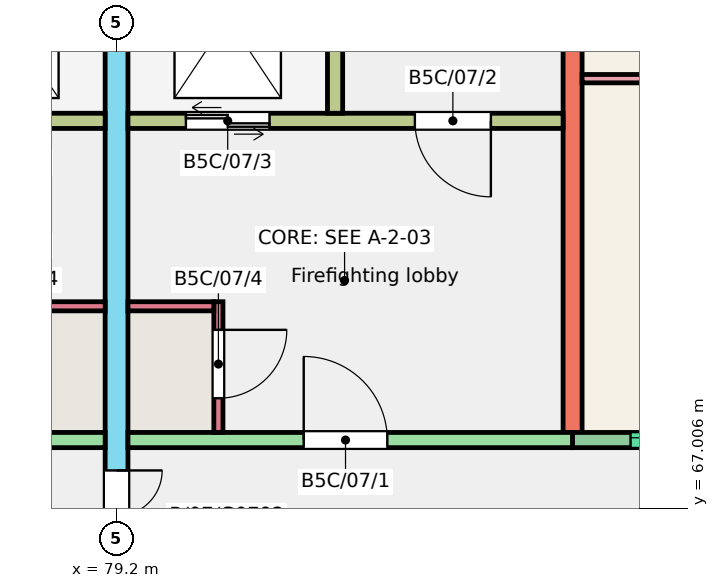
"""IFC4 building model, lengths in metres.
Left out: names, types, materials, properties, quantities, classifications, styles, units other than length and angle.
Written with IfcOpenShell. Run it as: python <this file> out.ifc"""

import sys

from ifc_helpers import new_model, si_unit, direction, frame, frame_2d, origin, place, context, subcontext, project, spatial, rectangle, extrude, element, fill, save


model = new_model("IFC4")
c1 = context("Model", 3, precision=1e-05, world=origin(), true_north=direction((0.0, 1.0)))
c2 = subcontext(c1, "Body", "Model", "MODEL_VIEW")
j1 = project(units=[si_unit("LENGTHUNIT", "METRE"), si_unit("PLANEANGLEUNIT", "RADIAN")], contexts=[c1])
p1 = place(None, origin())
s1 = spatial("IfcSite", under=j1, at=p1, CompositionType="ELEMENT")
p2 = place(p1, origin())
s2 = spatial("IfcBuilding", under=s1, at=p2, CompositionType="ELEMENT")
p3 = place(p2, frame((0.0, 0.0, 21.0)))
s3 = spatial("IfcBuildingStorey", under=s2, at=p3, CompositionType="ELEMENT", Elevation=21.0)
p4 = place(p3, frame((79.2, 66.0, 0.0), z_axis=(0.0, 0.0, 1.0), x_axis=(0.0, 1.0, 0.0)))
e1 = element("IfcWall", 1, at=p4, inside=s3, PredefinedType="SHEAR", context=c2, shape_type="SweptSolid", body=[
    extrude(rectangle(XDim=11.0, YDim=0.3, at=frame_2d((5.5, 0.0))), origin(), (0.0, 0.0, 1.0), 3.0),
])
p5 = place(p4, frame((0.3, 0.0, 0.0)))
e2 = element("IfcOpeningElement", 2, at=p5, cuts=e1, PredefinedType="OPENING", context=c2, shape_type="SweptSolid", body=[
    extrude(rectangle(XDim=1.2, YDim=2.1, at=frame_2d((0.6, 1.05))), frame((0.0, 0.16, 0.0), z_axis=(0.0, -1.0, 0.0), x_axis=(1.0, 0.0, 0.0)), (0.0, 0.0, 1.0), 0.32),
])
p6 = place(p3, frame((85.2, 68.0, 0.0), z_axis=(0.0, 0.0, 1.0), x_axis=(0.0, 1.0, 0.0)))
e3 = element("IfcWall", 3, at=p6, inside=s3, PredefinedType="SHEAR", context=c2, shape_type="SweptSolid", body=[
    extrude(rectangle(XDim=9.0, YDim=0.25, at=frame_2d((4.5, 0.0))), origin(), (0.0, 0.0, 1.0), 3.0),
])
p7 = place(p3, frame((73.2, 67.9, 0.0), z_axis=(0.0, 0.0, 1.0), x_axis=(1.0, 0.0, 0.0)))
e4 = element("IfcWall", 4, at=p7, inside=s3, PredefinedType="SHEAR", context=c2, shape_type="SweptSolid", body=[
    extrude(rectangle(XDim=5.85, YDim=0.2, at=frame_2d((2.925, 0.0))), origin(), (0.0, 0.0, 1.0), 3.0),
])
p8 = place(p7, frame((2.438, 0.0, 0.0)))
e5 = element("IfcOpeningElement", 5, at=p8, cuts=e4, PredefinedType="OPENING", context=c2, shape_type="SweptSolid", body=[
    extrude(rectangle(XDim=1.1, YDim=2.1, at=frame_2d((0.55, 1.05))), frame((0.0, 0.11, 0.0), z_axis=(0.0, -1.0, 0.0), x_axis=(1.0, 0.0, 0.0)), (0.0, 0.0, 1.0), 0.22),
])
p9 = place(p3, frame((73.325, 72.1, 0.0), z_axis=(0.0, 0.0, 1.0), x_axis=(1.0, 0.0, 0.0)))
e6 = element("IfcWall", 6, at=p9, inside=s3, PredefinedType="SHEAR", context=c2, shape_type="SweptSolid", body=[
    extrude(rectangle(XDim=5.725, YDim=0.2, at=frame_2d((2.863, 0.0))), origin(), (0.0, 0.0, 1.0), 3.0),
])
p10 = place(p9, frame((0.95, 0.0, 0.0)))
e7 = element("IfcOpeningElement", 7, at=p10, cuts=e6, PredefinedType="OPENING", context=c2, shape_type="SweptSolid", body=[
    extrude(rectangle(XDim=1.0, YDim=2.1, at=frame_2d((0.5, 1.05))), frame((0.0, 0.11, 0.0), z_axis=(0.0, -1.0, 0.0), x_axis=(1.0, 0.0, 0.0)), (0.0, 0.0, 1.0), 0.22),
])
p11 = place(p9, frame((3.863, 0.0, 0.0)))
e8 = element("IfcOpeningElement", 8, at=p11, cuts=e6, PredefinedType="OPENING", context=c2, shape_type="SweptSolid", body=[
    extrude(rectangle(XDim=1.1, YDim=2.1, at=frame_2d((0.55, 1.05))), frame((0.0, 0.11, 0.0), z_axis=(0.0, -1.0, 0.0), x_axis=(1.0, 0.0, 0.0)), (0.0, 0.0, 1.0), 0.22),
])
p12 = place(p3, frame((77.92, 69.66, 0.0), z_axis=(0.0, 0.0, 1.0), x_axis=(1.0, 0.0, 0.0)))
e9 = element("IfcWall", 9, at=p12, inside=s3, PredefinedType="SHEAR", context=c2, shape_type="SweptSolid", body=[
    extrude(rectangle(XDim=1.13, YDim=0.12, at=frame_2d((0.565, 0.0))), origin(), (0.0, 0.0, 1.0), 3.0),
])
p13 = place(p3, frame((79.35, 67.9, 0.0), z_axis=(0.0, 0.0, 1.0), x_axis=(1.0, 0.0, 0.0)))
e10 = element("IfcWall", 10, at=p13, inside=s3, PredefinedType="SHEAR", context=c2, shape_type="SweptSolid", body=[
    extrude(rectangle(XDim=5.85, YDim=0.2, at=frame_2d((2.925, 0.0))), origin(), (0.0, 0.0, 1.0), 3.0),
])
p14 = place(p13, frame((2.312, 0.0, 0.0)))
e11 = element("IfcOpeningElement", 11, at=p14, cuts=e10, PredefinedType="OPENING", context=c2, shape_type="SweptSolid", body=[
    extrude(rectangle(XDim=1.1, YDim=2.1, at=frame_2d((0.55, 1.05))), frame((0.0, 0.11, 0.0), z_axis=(0.0, -1.0, 0.0), x_axis=(1.0, 0.0, 0.0)), (0.0, 0.0, 1.0), 0.22),
])
p15 = place(p3, frame((79.35, 72.1, 0.0), z_axis=(0.0, 0.0, 1.0), x_axis=(1.0, 0.0, 0.0)))
e12 = element("IfcWall", 12, at=p15, inside=s3, PredefinedType="SHEAR", context=c2, shape_type="SweptSolid", body=[
    extrude(rectangle(XDim=5.725, YDim=0.2, at=frame_2d((2.862, 0.0))), origin(), (0.0, 0.0, 1.0), 3.0),
])
p16 = place(p15, frame((3.775, 0.0, 0.0)))
e13 = element("IfcOpeningElement", 13, at=p16, cuts=e12, PredefinedType="OPENING", context=c2, shape_type="SweptSolid", body=[
    extrude(rectangle(XDim=1.0, YDim=2.1, at=frame_2d((0.5, 1.05))), frame((0.0, 0.11, 0.0), z_axis=(0.0, -1.0, 0.0), x_axis=(1.0, 0.0, 0.0)), (0.0, 0.0, 1.0), 0.22),
])
p17 = place(p15, frame((0.762, 0.0, 0.0)))
e14 = element("IfcOpeningElement", 14, at=p17, cuts=e12, PredefinedType="OPENING", context=c2, shape_type="SweptSolid", body=[
    extrude(rectangle(XDim=1.1, YDim=2.1, at=frame_2d((0.55, 1.05))), frame((0.0, 0.11, 0.0), z_axis=(0.0, -1.0, 0.0), x_axis=(1.0, 0.0, 0.0)), (0.0, 0.0, 1.0), 0.22),
])
p18 = place(p3, frame((82.075, 72.2, 0.0), z_axis=(0.0, 0.0, 1.0), x_axis=(0.0, 1.0, 0.0)))
e15 = element("IfcWall", 15, at=p18, inside=s3, PredefinedType="SHEAR", context=c2, shape_type="SweptSolid", body=[
    extrude(rectangle(XDim=4.8, YDim=0.2, at=frame_2d((2.4, 0.0))), origin(), (0.0, 0.0, 1.0), 3.0),
])
p19 = place(p3, frame((80.54, 68.0, 0.0), z_axis=(0.0, 0.0, 1.0), x_axis=(0.0, 1.0, 0.0)))
e16 = element("IfcWall", 16, at=p19, inside=s3, PredefinedType="SHEAR", context=c2, shape_type="SweptSolid", body=[
    extrude(rectangle(XDim=1.72, YDim=0.12, at=frame_2d((0.86, 0.0))), origin(), (0.0, 0.0, 1.0), 3.0),
])
p20 = place(p19, frame((0.45, 0.0, 0.0)))
e17 = element("IfcOpeningElement", 17, at=p20, cuts=e16, PredefinedType="OPENING", context=c2, shape_type="SweptSolid", body=[
    extrude(rectangle(XDim=0.9, YDim=2.1, at=frame_2d((0.45, 1.05))), frame((0.0, 0.07, 0.0), z_axis=(0.0, -1.0, 0.0), x_axis=(1.0, 0.0, 0.0)), (0.0, 0.0, 1.0), 0.14),
])
p21 = place(p3, frame((79.35, 69.66, 0.0), z_axis=(0.0, 0.0, 1.0), x_axis=(1.0, 0.0, 0.0)))
e18 = element("IfcWall", 18, at=p21, inside=s3, PredefinedType="SHEAR", context=c2, shape_type="SweptSolid", body=[
    extrude(rectangle(XDim=1.13, YDim=0.12, at=frame_2d((0.565, 0.0))), origin(), (0.0, 0.0, 1.0), 3.0),
])
p22 = place(p3, frame((85.2, 67.9, 0.0), z_axis=(0.0, 0.0, 1.0), x_axis=(1.0, 0.0, 0.0)))
e19 = element("IfcWall", 19, at=p22, inside=s3, PredefinedType="SOLIDWALL", context=c2, shape_type="SweptSolid", body=[
    extrude(rectangle(XDim=3.6, YDim=0.2, at=frame_2d((1.8, 0.0))), origin(), (0.0, 0.0, 1.0), 3.0),
])
p23 = place(p22, frame((0.762, 0.0, 1.2)))
e20 = element("IfcOpeningElement", 20, at=p23, cuts=e19, PredefinedType="OPENING", context=c2, shape_type="SweptSolid", body=[
    extrude(rectangle(XDim=2.1, YDim=1.2, at=frame_2d((1.05, 0.6))), frame((0.0, 0.11, 0.0), z_axis=(0.0, -1.0, 0.0), x_axis=(1.0, 0.0, 0.0)), (0.0, 0.0, 1.0), 0.22),
])
p24 = place(p3, frame((85.325, 72.655, 0.0), z_axis=(0.0, 0.0, 1.0), x_axis=(1.0, 0.0, 0.0)))
e21 = element("IfcWall", 21, at=p24, inside=s3, PredefinedType="PARTITIONING", context=c2, shape_type="SweptSolid", body=[
    extrude(rectangle(XDim=3.375, YDim=0.11, at=frame_2d((1.688, 0.0))), origin(), (0.0, 0.0, 1.0), 2.8),
])
p25 = place(p23, origin())
e22 = element("IfcWindow", 22, at=p25, inside=s3, PartitioningType="SINGLE_PANEL", PredefinedType="WINDOW", context=c2, shape_type="SweptSolid", body=[
    extrude(rectangle(XDim=2.1, YDim=1.2, at=frame_2d((1.05, 0.6))), frame((0.0, 0.06, 0.0), z_axis=(0.0, -1.0, 0.0), x_axis=(1.0, 0.0, 0.0)), (0.0, 0.0, 1.0), 0.06),
])
fill(e20, e22)
p26 = place(p14, origin())
e23 = element("IfcDoor", 23, at=p26, inside=s3, OperationType="SINGLE_SWING_LEFT", PredefinedType="DOOR", context=c2, shape_type="SweptSolid", body=[
    extrude(rectangle(XDim=1.1, YDim=2.1, at=frame_2d((0.55, 1.05))), frame((0.0, 0.025, 0.0), z_axis=(0.0, -1.0, 0.0), x_axis=(1.0, 0.0, 0.0)), (0.0, 0.0, 1.0), 0.05),
])
fill(e11, e23)
p27 = place(p16, origin())
e24 = element("IfcDoor", 24, at=p27, inside=s3, OperationType="SINGLE_SWING_RIGHT", PredefinedType="DOOR", context=c2, shape_type="SweptSolid", body=[
    extrude(rectangle(XDim=1.0, YDim=2.1, at=frame_2d((0.5, 1.05))), frame((0.0, 0.025, 0.0), z_axis=(0.0, -1.0, 0.0), x_axis=(1.0, 0.0, 0.0)), (0.0, 0.0, 1.0), 0.05),
])
fill(e13, e24)
p28 = place(p17, origin())
e25 = element("IfcDoor", 25, at=p28, inside=s3, OperationType="DOUBLE_DOOR_SLIDING", PredefinedType="DOOR", context=c2, shape_type="SweptSolid", body=[
    extrude(rectangle(XDim=1.1, YDim=2.1, at=frame_2d((0.55, 1.05))), frame((0.0, 0.025, 0.0), z_axis=(0.0, -1.0, 0.0), x_axis=(1.0, 0.0, 0.0)), (0.0, 0.0, 1.0), 0.05),
])
fill(e14, e25)
p29 = place(p20, origin())
e26 = element("IfcDoor", 26, at=p29, inside=s3, OperationType="SINGLE_SWING_RIGHT", PredefinedType="DOOR", context=c2, shape_type="SweptSolid", body=[
    extrude(rectangle(XDim=0.9, YDim=2.1, at=frame_2d((0.45, 1.05))), frame((0.0, 0.025, 0.0), z_axis=(0.0, -1.0, 0.0), x_axis=(1.0, 0.0, 0.0)), (0.0, 0.0, 1.0), 0.05),
])
fill(e17, e26)
p30 = place(p5, origin())
e27 = element("IfcDoor", 27, at=p30, inside=s3, OperationType="DOUBLE_DOOR_SINGLE_SWING", PredefinedType="DOOR", context=c2, shape_type="SweptSolid", body=[
    extrude(rectangle(XDim=1.2, YDim=2.1, at=frame_2d((0.6, 1.05))), frame((0.0, 0.025, 0.0), z_axis=(0.0, -1.0, 0.0), x_axis=(1.0, 0.0, 0.0)), (0.0, 0.0, 1.0), 0.05),
])
fill(e2, e27)
save(model, sys.argv[1])
